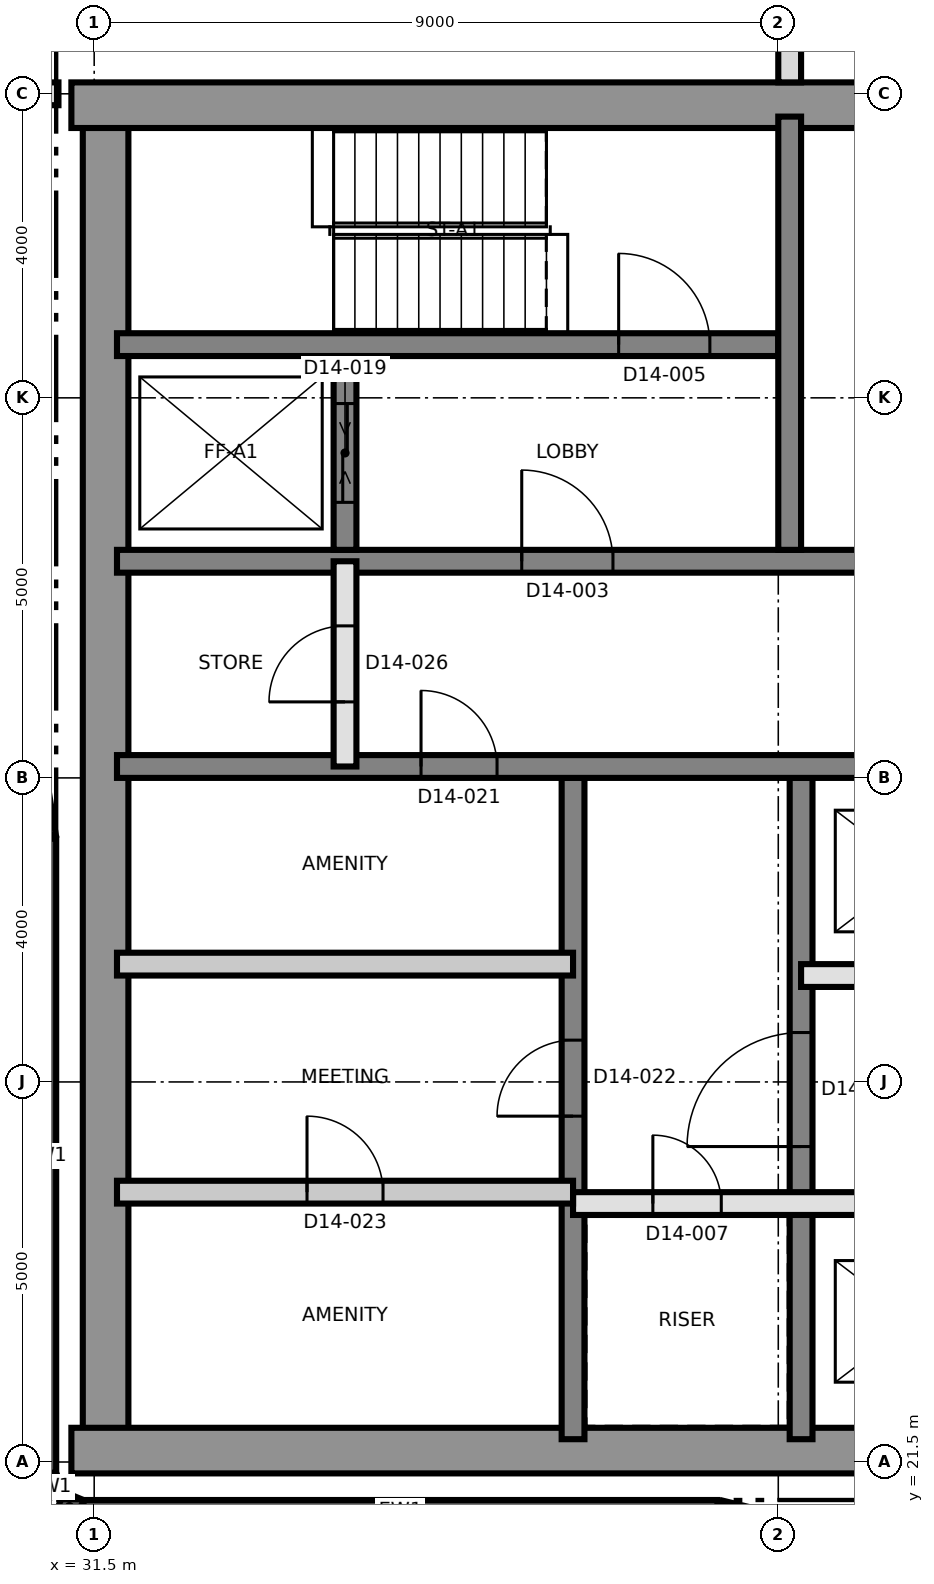
"""IFC4 building model, lengths in metres.
Left out: names, types, materials, properties, quantities, classifications, styles, units other than length and angle.
Written with IfcOpenShell. Run it as: python <this file> out.ifc"""

import sys

from ifc_helpers import new_model, si_unit, direction, frame, frame_2d, origin, place, context, subcontext, project, spatial, rectangle, extrude, element, fill, save


model = new_model("IFC4")
c1 = context("Model", 3, precision=1e-05, world=origin(), true_north=direction((0.0, 1.0)))
c2 = subcontext(c1, "Body", "Model", "MODEL_VIEW")
j1 = project(units=[si_unit("LENGTHUNIT", "METRE"), si_unit("PLANEANGLEUNIT", "RADIAN")], contexts=[c1])
p1 = place(None, origin())
s1 = spatial("IfcSite", under=j1, at=p1, CompositionType="ELEMENT")
p2 = place(p1, origin())
s2 = spatial("IfcBuilding", under=s1, at=p2, CompositionType="ELEMENT")
p3 = place(p2, frame((0.0, 0.0, 149.6)))
s3 = spatial("IfcBuildingStorey", under=s2, at=p3, CompositionType="ELEMENT", Elevation=149.6)
p4 = place(p3, frame((31.65, 21.8, 0.0), z_axis=(0.0, 0.0, 1.0), x_axis=(0.0, 1.0, 0.0)))
e1 = element("IfcWall", 1, at=p4, inside=s3, PredefinedType="SHEAR", context=c2, shape_type="SweptSolid", body=[
    extrude(rectangle(XDim=17.4, YDim=0.6, at=frame_2d((8.7, 0.0))), origin(), (0.0, 0.0, 1.0), 3.7),
])
p5 = place(p3, frame((31.2, 21.65, 0.0), z_axis=(0.0, 0.0, 1.0), x_axis=(1.0, 0.0, 0.0)))
e2 = element("IfcWall", 2, at=p5, inside=s3, PredefinedType="SHEAR", context=c2, shape_type="SweptSolid", body=[
    extrude(rectangle(XDim=27.0, YDim=0.6, at=frame_2d((13.5, 0.0))), origin(), (0.0, 0.0, 1.0), 3.7),
])
p6 = place(p3, frame((31.2, 39.35, 0.0), z_axis=(0.0, 0.0, 1.0), x_axis=(1.0, 0.0, 0.0)))
e3 = element("IfcWall", 3, at=p6, inside=s3, PredefinedType="SHEAR", context=c2, shape_type="SweptSolid", body=[
    extrude(rectangle(XDim=27.0, YDim=0.6, at=frame_2d((13.5, 0.0))), origin(), (0.0, 0.0, 1.0), 3.7),
])
p7 = place(p6, frame((10.5, 0.0, 0.0)))
e4 = element("IfcOpeningElement", 4, at=p7, cuts=e3, PredefinedType="OPENING", context=c2, shape_type="SweptSolid", body=[
    extrude(rectangle(XDim=1.2, YDim=2.1, at=frame_2d((0.6, 1.05))), frame((0.0, 0.31, 0.0), z_axis=(0.0, -1.0, 0.0), x_axis=(1.0, 0.0, 0.0)), (0.0, 0.0, 1.0), 0.62),
])
p8 = place(p3, frame((37.8, 21.8, 0.0), z_axis=(0.0, 0.0, 1.0), x_axis=(0.0, 1.0, 0.0)))
e5 = element("IfcWall", 5, at=p8, inside=s3, PredefinedType="SHEAR", context=c2, shape_type="SweptSolid", body=[
    extrude(rectangle(XDim=8.7, YDim=0.3, at=frame_2d((4.35, 0.0))), origin(), (0.0, 0.0, 1.0), 3.7),
])
p9 = place(p8, frame((4.25, 0.0, 0.0)))
e6 = element("IfcOpeningElement", 6, at=p9, cuts=e5, PredefinedType="OPENING", context=c2, shape_type="SweptSolid", body=[
    extrude(rectangle(XDim=1.0, YDim=2.1, at=frame_2d((0.5, 1.05))), frame((0.0, 0.16, 0.0), z_axis=(0.0, -1.0, 0.0), x_axis=(1.0, 0.0, 0.0)), (0.0, 0.0, 1.0), 0.32),
])
p10 = place(p3, frame((40.8, 21.8, 0.0), z_axis=(0.0, 0.0, 1.0), x_axis=(0.0, 1.0, 0.0)))
e7 = element("IfcWall", 7, at=p10, inside=s3, PredefinedType="SHEAR", context=c2, shape_type="SweptSolid", body=[
    extrude(rectangle(XDim=8.7, YDim=0.3, at=frame_2d((4.35, 0.0))), origin(), (0.0, 0.0, 1.0), 3.7),
])
p11 = place(p10, frame((3.85, 0.0, 0.0)))
e8 = element("IfcOpeningElement", 8, at=p11, cuts=e7, PredefinedType="OPENING", context=c2, shape_type="SweptSolid", body=[
    extrude(rectangle(XDim=1.5, YDim=2.1, at=frame_2d((0.75, 1.05))), frame((0.0, 0.16, 0.0), z_axis=(0.0, -1.0, 0.0), x_axis=(1.0, 0.0, 0.0)), (0.0, 0.0, 1.0), 0.32),
])
p12 = place(p3, frame((31.8, 30.65, 0.0), z_axis=(0.0, 0.0, 1.0), x_axis=(1.0, 0.0, 0.0)))
e9 = element("IfcWall", 9, at=p12, inside=s3, PredefinedType="SHEAR", context=c2, shape_type="SweptSolid", body=[
    extrude(rectangle(XDim=26.4, YDim=0.3, at=frame_2d((13.2, 0.0))), origin(), (0.0, 0.0, 1.0), 3.7),
])
p13 = place(p12, frame((24.7, 0.0, 0.0)))
e10 = element("IfcOpeningElement", 10, at=p13, cuts=e9, PredefinedType="OPENING", context=c2, shape_type="SweptSolid", body=[
    extrude(rectangle(XDim=1.0, YDim=2.1, at=frame_2d((0.5, 1.05))), frame((0.0, 0.16, 0.0), z_axis=(0.0, -1.0, 0.0), x_axis=(1.0, 0.0, 0.0)), (0.0, 0.0, 1.0), 0.32),
])
p14 = place(p12, frame((4.0, 0.0, 0.0)))
e11 = element("IfcOpeningElement", 11, at=p14, cuts=e9, PredefinedType="OPENING", context=c2, shape_type="SweptSolid", body=[
    extrude(rectangle(XDim=1.0, YDim=2.1, at=frame_2d((0.5, 1.05))), frame((0.0, 0.16, 0.0), z_axis=(0.0, -1.0, 0.0), x_axis=(1.0, 0.0, 0.0)), (0.0, 0.0, 1.0), 0.32),
])
p15 = place(p3, frame((31.8, 33.35, 0.0), z_axis=(0.0, 0.0, 1.0), x_axis=(1.0, 0.0, 0.0)))
e12 = element("IfcWall", 12, at=p15, inside=s3, PredefinedType="SHEAR", context=c2, shape_type="SweptSolid", body=[
    extrude(rectangle(XDim=26.4, YDim=0.3, at=frame_2d((13.2, 0.0))), origin(), (0.0, 0.0, 1.0), 3.7),
])
p16 = place(p15, frame((13.85, 0.0, 0.0)))
e13 = element("IfcOpeningElement", 13, at=p16, cuts=e12, PredefinedType="OPENING", context=c2, shape_type="SweptSolid", body=[
    extrude(rectangle(XDim=1.4, YDim=2.1, at=frame_2d((0.7, 1.05))), frame((0.0, 0.16, 0.0), z_axis=(0.0, -1.0, 0.0), x_axis=(1.0, 0.0, 0.0)), (0.0, 0.0, 1.0), 0.32),
])
p17 = place(p15, frame((5.325, 0.0, 0.0)))
e14 = element("IfcOpeningElement", 14, at=p17, cuts=e12, PredefinedType="OPENING", context=c2, shape_type="SweptSolid", body=[
    extrude(rectangle(XDim=1.2, YDim=2.1, at=frame_2d((0.6, 1.05))), frame((0.0, 0.16, 0.0), z_axis=(0.0, -1.0, 0.0), x_axis=(1.0, 0.0, 0.0)), (0.0, 0.0, 1.0), 0.32),
])
p18 = place(p15, frame((19.875, 0.0, 0.0)))
e15 = element("IfcOpeningElement", 15, at=p18, cuts=e12, PredefinedType="OPENING", context=c2, shape_type="SweptSolid", body=[
    extrude(rectangle(XDim=1.2, YDim=2.1, at=frame_2d((0.6, 1.05))), frame((0.0, 0.16, 0.0), z_axis=(0.0, -1.0, 0.0), x_axis=(1.0, 0.0, 0.0)), (0.0, 0.0, 1.0), 0.32),
])
p19 = place(p3, frame((31.8, 36.2, 0.0), z_axis=(0.0, 0.0, 1.0), x_axis=(1.0, 0.0, 0.0)))
e16 = element("IfcWall", 16, at=p19, inside=s3, PredefinedType="SHEAR", context=c2, shape_type="SweptSolid", body=[
    extrude(rectangle(XDim=8.7, YDim=0.3, at=frame_2d((4.35, 0.0))), origin(), (0.0, 0.0, 1.0), 3.7),
])
p20 = place(p19, frame((6.6, 0.0, 0.0)))
e17 = element("IfcOpeningElement", 17, at=p20, cuts=e16, PredefinedType="OPENING", context=c2, shape_type="SweptSolid", body=[
    extrude(rectangle(XDim=1.2, YDim=2.1, at=frame_2d((0.6, 1.05))), frame((0.0, 0.16, 0.0), z_axis=(0.0, -1.0, 0.0), x_axis=(1.0, 0.0, 0.0)), (0.0, 0.0, 1.0), 0.32),
])
p21 = place(p3, frame((40.65, 33.5, 0.0), z_axis=(0.0, 0.0, 1.0), x_axis=(0.0, 1.0, 0.0)))
e18 = element("IfcWall", 18, at=p21, inside=s3, PredefinedType="SHEAR", context=c2, shape_type="SweptSolid", body=[
    extrude(rectangle(XDim=5.7, YDim=0.3, at=frame_2d((2.85, 0.0))), origin(), (0.0, 0.0, 1.0), 3.7),
])
p22 = place(p3, frame((34.8, 33.5, 0.0), z_axis=(0.0, 0.0, 1.0), x_axis=(0.0, 1.0, 0.0)))
e19 = element("IfcWall", 19, at=p22, inside=s3, PredefinedType="SHEAR", context=c2, shape_type="SweptSolid", body=[
    extrude(rectangle(XDim=2.55, YDim=0.3, at=frame_2d((1.275, 0.0))), origin(), (0.0, 0.0, 1.0), 3.7),
])
p23 = place(p22, frame((0.625, 0.0, 0.0)))
e20 = element("IfcOpeningElement", 20, at=p23, cuts=e19, PredefinedType="OPENING", context=c2, shape_type="SweptSolid", body=[
    extrude(rectangle(XDim=1.3, YDim=2.4, at=frame_2d((0.65, 1.2))), frame((0.0, 0.16, 0.0), z_axis=(0.0, -1.0, 0.0), x_axis=(1.0, 0.0, 0.0)), (0.0, 0.0, 1.0), 0.32),
])
p24 = place(p3, frame((30.85, 29.699, 0.0), z_axis=(0.0, 0.0, 1.0), x_axis=(0.0, -1.0, 0.0)))
e21 = element("IfcWall", 21, at=p24, inside=s3, PredefinedType="SOLIDWALL", context=c2, shape_type="SweptSolid", body=[
    extrude(rectangle(XDim=8.34, YDim=0.3, at=frame_2d((4.17, 0.0))), origin(), (0.0, 0.0, 1.0), 3.4),
])
for number, where, z_axis, x_axis in (
    (22, (30.861, 21.302, 0.0), (0.0, 0.0, 1.0), (0.383, -0.924, 0.0)),
    (23, (31.048, 20.967, 0.0), (0.0, 0.0, 1.0), (0.924, -0.383, 0.0)),
):
    element("IfcWall", number, at=place(p3, frame(where, z_axis=z_axis, x_axis=x_axis)), inside=s3, PredefinedType="SOLIDWALL", context=c2, shape_type="SweptSolid", body=[
        extrude(rectangle(XDim=0.275, YDim=0.3, at=frame_2d((0.138, 0.0))), origin(), (0.0, 0.0, 1.0), 3.4),
    ])
p25 = place(p3, frame((31.36, 20.85, 0.0), z_axis=(0.0, 0.0, 1.0), x_axis=(1.0, 0.0, 0.0)))
e24 = element("IfcWall", 24, at=p25, inside=s3, PredefinedType="SOLIDWALL", context=c2, shape_type="SweptSolid", body=[
    extrude(rectangle(XDim=8.34, YDim=0.3, at=frame_2d((4.17, 0.0))), origin(), (0.0, 0.0, 1.0), 3.4),
])
p26 = place(p3, frame((39.735, 20.846, 0.0), z_axis=(0.0, 0.0, 1.0), x_axis=(0.97206095595, -0.234728562212, 0.0)))
e25 = element("IfcWall", 25, at=p26, inside=s3, PredefinedType="SOLIDWALL", context=c2, shape_type="SweptSolid", body=[
    extrude(rectangle(XDim=2.35, YDim=0.3, at=frame_2d((1.175, 0.0))), origin(), (0.0, 0.0, 1.0), 3.4),
])
p27 = place(p3, frame((30.152, 34.0, 0.0), z_axis=(0.0, 0.0, 1.0), x_axis=(0.160697303067, -0.987003736967, 0.0)))
e26 = element("IfcWall", 26, at=p27, inside=s3, PredefinedType="SOLIDWALL", context=c2, shape_type="SweptSolid", body=[
    extrude(rectangle(XDim=4.333, YDim=0.3, at=frame_2d((2.167, 0.0))), origin(), (0.0, 0.0, 1.0), 3.4),
])
p28 = place(p27, frame((0.366, 0.0, 0.9)))
e27 = element("IfcOpeningElement", 27, at=p28, cuts=e26, PredefinedType="OPENING", context=c2, shape_type="SweptSolid", body=[
    extrude(rectangle(XDim=3.6, YDim=1.5, at=frame_2d((1.8, 0.75))), frame((0.0, 0.16, 0.0), z_axis=(0.0, -1.0, 0.0), x_axis=(1.0, 0.0, 0.0)), (0.0, 0.0, 1.0), 0.32),
])
p29 = place(p3, frame((37.8, 24.9, 0.0), z_axis=(0.0, 0.0, 1.0), x_axis=(1.0, 0.0, 0.0)))
e28 = element("IfcWall", 28, at=p29, inside=s3, PredefinedType="SOLIDWALL", context=c2, shape_type="SweptSolid", body=[
    extrude(rectangle(XDim=12.0, YDim=0.3, at=frame_2d((6.0, 0.0))), origin(), (0.0, 0.0, 1.0), 3.4),
])
p30 = place(p29, frame((1.05, 0.0, 0.0)))
e29 = element("IfcOpeningElement", 29, at=p30, cuts=e28, PredefinedType="OPENING", context=c2, shape_type="SweptSolid", body=[
    extrude(rectangle(XDim=0.9, YDim=2.1, at=frame_2d((0.45, 1.05))), frame((0.0, 0.16, 0.0), z_axis=(0.0, -1.0, 0.0), x_axis=(1.0, 0.0, 0.0)), (0.0, 0.0, 1.0), 0.32),
])
p31 = place(p29, frame((10.05, 0.0, 0.0)))
e30 = element("IfcOpeningElement", 30, at=p31, cuts=e28, PredefinedType="OPENING", context=c2, shape_type="SweptSolid", body=[
    extrude(rectangle(XDim=0.9, YDim=2.1, at=frame_2d((0.45, 1.05))), frame((0.0, 0.16, 0.0), z_axis=(0.0, -1.0, 0.0), x_axis=(1.0, 0.0, 0.0)), (0.0, 0.0, 1.0), 0.32),
])
p32 = place(p29, frame((3.95, 0.0, 0.0)))
e31 = element("IfcOpeningElement", 31, at=p32, cuts=e28, PredefinedType="OPENING", context=c2, shape_type="SweptSolid", body=[
    extrude(rectangle(XDim=1.1, YDim=2.4, at=frame_2d((0.55, 1.2))), frame((0.0, 0.16, 0.0), z_axis=(0.0, -1.0, 0.0), x_axis=(1.0, 0.0, 0.0)), (0.0, 0.0, 1.0), 0.32),
])
p33 = place(p29, frame((6.95, 0.0, 0.0)))
e32 = element("IfcOpeningElement", 32, at=p33, cuts=e28, PredefinedType="OPENING", context=c2, shape_type="SweptSolid", body=[
    extrude(rectangle(XDim=1.1, YDim=2.4, at=frame_2d((0.55, 1.2))), frame((0.0, 0.16, 0.0), z_axis=(0.0, -1.0, 0.0), x_axis=(1.0, 0.0, 0.0)), (0.0, 0.0, 1.0), 0.32),
])
p34 = place(p3, frame((31.8, 25.05, 0.0), z_axis=(0.0, 0.0, 1.0), x_axis=(1.0, 0.0, 0.0)))
e33 = element("IfcWall", 33, at=p34, inside=s3, PredefinedType="PARTITIONING", context=c2, shape_type="SweptSolid", body=[
    extrude(rectangle(XDim=6.0, YDim=0.3, at=frame_2d((3.0, 0.0))), origin(), (0.0, 0.0, 1.0), 3.4),
])
p35 = place(p34, frame((2.5, 0.0, 0.0)))
e34 = element("IfcOpeningElement", 34, at=p35, cuts=e33, PredefinedType="OPENING", context=c2, shape_type="SweptSolid", body=[
    extrude(rectangle(XDim=1.0, YDim=2.1, at=frame_2d((0.5, 1.05))), frame((0.0, 0.16, 0.0), z_axis=(0.0, -1.0, 0.0), x_axis=(1.0, 0.0, 0.0)), (0.0, 0.0, 1.0), 0.32),
])
p36 = place(p3, frame((40.8, 27.9, 0.0), z_axis=(0.0, 0.0, 1.0), x_axis=(1.0, 0.0, 0.0)))
e35 = element("IfcWall", 35, at=p36, inside=s3, PredefinedType="SOLIDWALL", context=c2, shape_type="SweptSolid", body=[
    extrude(rectangle(XDim=6.0, YDim=0.3, at=frame_2d((3.0, 0.0))), origin(), (0.0, 0.0, 1.0), 3.4),
])
p37 = place(p36, frame((0.95, 0.0, 0.0)))
e36 = element("IfcOpeningElement", 36, at=p37, cuts=e35, PredefinedType="OPENING", context=c2, shape_type="SweptSolid", body=[
    extrude(rectangle(XDim=1.1, YDim=2.4, at=frame_2d((0.55, 1.2))), frame((0.0, 0.16, 0.0), z_axis=(0.0, -1.0, 0.0), x_axis=(1.0, 0.0, 0.0)), (0.0, 0.0, 1.0), 0.32),
])
p38 = place(p36, frame((3.95, 0.0, 0.0)))
e37 = element("IfcOpeningElement", 37, at=p38, cuts=e35, PredefinedType="OPENING", context=c2, shape_type="SweptSolid", body=[
    extrude(rectangle(XDim=1.1, YDim=2.4, at=frame_2d((0.55, 1.2))), frame((0.0, 0.16, 0.0), z_axis=(0.0, -1.0, 0.0), x_axis=(1.0, 0.0, 0.0)), (0.0, 0.0, 1.0), 0.32),
])
p39 = place(p3, frame((31.8, 28.05, 0.0), z_axis=(0.0, 0.0, 1.0), x_axis=(1.0, 0.0, 0.0)))
e38 = element("IfcWall", 38, at=p39, inside=s3, PredefinedType="PARTITIONING", context=c2, shape_type="SweptSolid", body=[
    extrude(rectangle(XDim=6.0, YDim=0.3, at=frame_2d((3.0, 0.0))), origin(), (0.0, 0.0, 1.0), 3.4),
])
p40 = place(p3, frame((34.8, 30.65, 0.0), z_axis=(0.0, 0.0, 1.0), x_axis=(0.0, 1.0, 0.0)))
e39 = element("IfcWall", 39, at=p40, inside=s3, PredefinedType="SOLIDWALL", context=c2, shape_type="SweptSolid", body=[
    extrude(rectangle(XDim=2.7, YDim=0.3, at=frame_2d((1.35, 0.0))), origin(), (0.0, 0.0, 1.0), 3.4),
])
p41 = place(p40, frame((0.85, 0.0, 0.0)))
e40 = element("IfcOpeningElement", 40, at=p41, cuts=e39, PredefinedType="OPENING", context=c2, shape_type="SweptSolid", body=[
    extrude(rectangle(XDim=1.0, YDim=2.1, at=frame_2d((0.5, 1.05))), frame((0.0, 0.16, 0.0), z_axis=(0.0, -1.0, 0.0), x_axis=(1.0, 0.0, 0.0)), (0.0, 0.0, 1.0), 0.32),
])
p42 = place(p3, frame((30.35, 39.5, 0.0), z_axis=(0.0, 0.0, 1.0), x_axis=(1.0, 0.0, 0.0)))
e41 = element("IfcWall", 41, at=p42, inside=s3, PredefinedType="PARTITIONING", context=c2, shape_type="SweptSolid", body=[
    extrude(rectangle(XDim=0.68, YDim=0.3, at=frame_2d((0.34, 0.0))), origin(), (0.0, 0.0, 1.0), 3.35),
])
p43 = place(p3, frame((40.65, 39.65, 0.0), z_axis=(0.0, 0.0, 1.0), x_axis=(0.0, 1.0, 0.0)))
e42 = element("IfcWall", 42, at=p43, inside=s3, PredefinedType="PARTITIONING", context=c2, shape_type="SweptSolid", body=[
    extrude(rectangle(XDim=37.24, YDim=0.3, at=frame_2d((18.62, 0.0))), origin(), (0.0, 0.0, 1.0), 3.35),
])
p44 = place(p43, frame((2.2, 0.0, 0.0)))
e43 = element("IfcOpeningElement", 43, at=p44, cuts=e42, PredefinedType="OPENING", context=c2, shape_type="SweptSolid", body=[
    extrude(rectangle(XDim=1.0, YDim=2.4, at=frame_2d((0.5, 1.2))), frame((0.0, 0.16, 0.0), z_axis=(0.0, -1.0, 0.0), x_axis=(1.0, 0.0, 0.0)), (0.0, 0.0, 1.0), 0.32),
])
p45 = place(p43, frame((9.985, 0.0, 0.0)))
e44 = element("IfcOpeningElement", 44, at=p45, cuts=e42, PredefinedType="OPENING", context=c2, shape_type="SweptSolid", body=[
    extrude(rectangle(XDim=1.2, YDim=2.1, at=frame_2d((0.6, 1.05))), frame((0.0, 0.16, 0.0), z_axis=(0.0, -1.0, 0.0), x_axis=(1.0, 0.0, 0.0)), (0.0, 0.0, 1.0), 0.32),
])
p46 = place(p43, frame((13.235, 0.0, 0.0)))
e45 = element("IfcOpeningElement", 45, at=p46, cuts=e42, PredefinedType="OPENING", context=c2, shape_type="SweptSolid", body=[
    extrude(rectangle(XDim=1.0, YDim=2.1, at=frame_2d((0.5, 1.05))), frame((0.0, 0.16, 0.0), z_axis=(0.0, -1.0, 0.0), x_axis=(1.0, 0.0, 0.0)), (0.0, 0.0, 1.0), 0.32),
])
p47 = place(p43, frame((21.35, 0.0, 0.0)))
e46 = element("IfcOpeningElement", 46, at=p47, cuts=e42, PredefinedType="OPENING", context=c2, shape_type="SweptSolid", body=[
    extrude(rectangle(XDim=1.0, YDim=2.4, at=frame_2d((0.5, 1.2))), frame((0.0, 0.16, 0.0), z_axis=(0.0, -1.0, 0.0), x_axis=(1.0, 0.0, 0.0)), (0.0, 0.0, 1.0), 0.32),
])
p48 = place(p11, origin())
e47 = element("IfcDoor", 47, at=p48, inside=s3, OperationType="SINGLE_SWING_RIGHT", PredefinedType="DOOR", context=c2, shape_type="SweptSolid", body=[
    extrude(rectangle(XDim=1.5, YDim=2.1, at=frame_2d((0.75, 1.05))), frame((0.0, 0.025, 0.0), z_axis=(0.0, -1.0, 0.0), x_axis=(1.0, 0.0, 0.0)), (0.0, 0.0, 1.0), 0.05),
])
fill(e8, e47)
p49 = place(p17, origin())
e48 = element("IfcDoor", 48, at=p49, inside=s3, OperationType="SINGLE_SWING_LEFT", PredefinedType="DOOR", context=c2, shape_type="SweptSolid", body=[
    extrude(rectangle(XDim=1.2, YDim=2.1, at=frame_2d((0.6, 1.05))), frame((0.0, 0.025, 0.0), z_axis=(0.0, -1.0, 0.0), x_axis=(1.0, 0.0, 0.0)), (0.0, 0.0, 1.0), 0.05),
])
fill(e14, e48)
p50 = place(p20, origin())
e49 = element("IfcDoor", 49, at=p50, inside=s3, OperationType="SINGLE_SWING_RIGHT", PredefinedType="DOOR", context=c2, shape_type="SweptSolid", body=[
    extrude(rectangle(XDim=1.2, YDim=2.1, at=frame_2d((0.6, 1.05))), frame((0.0, 0.025, 0.0), z_axis=(0.0, -1.0, 0.0), x_axis=(1.0, 0.0, 0.0)), (0.0, 0.0, 1.0), 0.05),
])
fill(e17, e49)
p51 = place(p30, origin())
e50 = element("IfcDoor", 50, at=p51, inside=s3, OperationType="SINGLE_SWING_LEFT", PredefinedType="DOOR", context=c2, shape_type="SweptSolid", body=[
    extrude(rectangle(XDim=0.9, YDim=2.1, at=frame_2d((0.45, 1.05))), frame((0.0, 0.025, 0.0), z_axis=(0.0, -1.0, 0.0), x_axis=(1.0, 0.0, 0.0)), (0.0, 0.0, 1.0), 0.05),
])
fill(e29, e50)
p52 = place(p23, origin())
e51 = element("IfcDoor", 51, at=p52, inside=s3, OperationType="SLIDING_TO_LEFT", PredefinedType="DOOR", context=c2, shape_type="SweptSolid", body=[
    extrude(rectangle(XDim=1.3, YDim=2.4, at=frame_2d((0.65, 1.2))), frame((0.0, 0.025, 0.0), z_axis=(0.0, -1.0, 0.0), x_axis=(1.0, 0.0, 0.0)), (0.0, 0.0, 1.0), 0.05),
])
fill(e20, e51)
p53 = place(p14, origin())
e52 = element("IfcDoor", 52, at=p53, inside=s3, OperationType="SINGLE_SWING_LEFT", PredefinedType="DOOR", context=c2, shape_type="SweptSolid", body=[
    extrude(rectangle(XDim=1.0, YDim=2.1, at=frame_2d((0.5, 1.05))), frame((0.0, 0.025, 0.0), z_axis=(0.0, -1.0, 0.0), x_axis=(1.0, 0.0, 0.0)), (0.0, 0.0, 1.0), 0.05),
])
fill(e11, e52)
p54 = place(p9, origin())
e53 = element("IfcDoor", 53, at=p54, inside=s3, OperationType="SINGLE_SWING_RIGHT", PredefinedType="DOOR", context=c2, shape_type="SweptSolid", body=[
    extrude(rectangle(XDim=1.0, YDim=2.1, at=frame_2d((0.5, 1.05))), frame((0.0, 0.025, 0.0), z_axis=(0.0, -1.0, 0.0), x_axis=(1.0, 0.0, 0.0)), (0.0, 0.0, 1.0), 0.05),
])
fill(e6, e53)
p55 = place(p35, origin())
e54 = element("IfcDoor", 54, at=p55, inside=s3, OperationType="SINGLE_SWING_RIGHT", PredefinedType="DOOR", context=c2, shape_type="SweptSolid", body=[
    extrude(rectangle(XDim=1.0, YDim=2.1, at=frame_2d((0.5, 1.05))), frame((0.0, 0.025, 0.0), z_axis=(0.0, -1.0, 0.0), x_axis=(1.0, 0.0, 0.0)), (0.0, 0.0, 1.0), 0.05),
])
fill(e34, e54)
p56 = place(p41, origin())
e55 = element("IfcDoor", 55, at=p56, inside=s3, OperationType="SINGLE_SWING_RIGHT", PredefinedType="DOOR", context=c2, shape_type="SweptSolid", body=[
    extrude(rectangle(XDim=1.0, YDim=2.1, at=frame_2d((0.5, 1.05))), frame((0.0, 0.025, 0.0), z_axis=(0.0, -1.0, 0.0), x_axis=(1.0, 0.0, 0.0)), (0.0, 0.0, 1.0), 0.05),
])
fill(e40, e55)
save(model, sys.argv[1])
